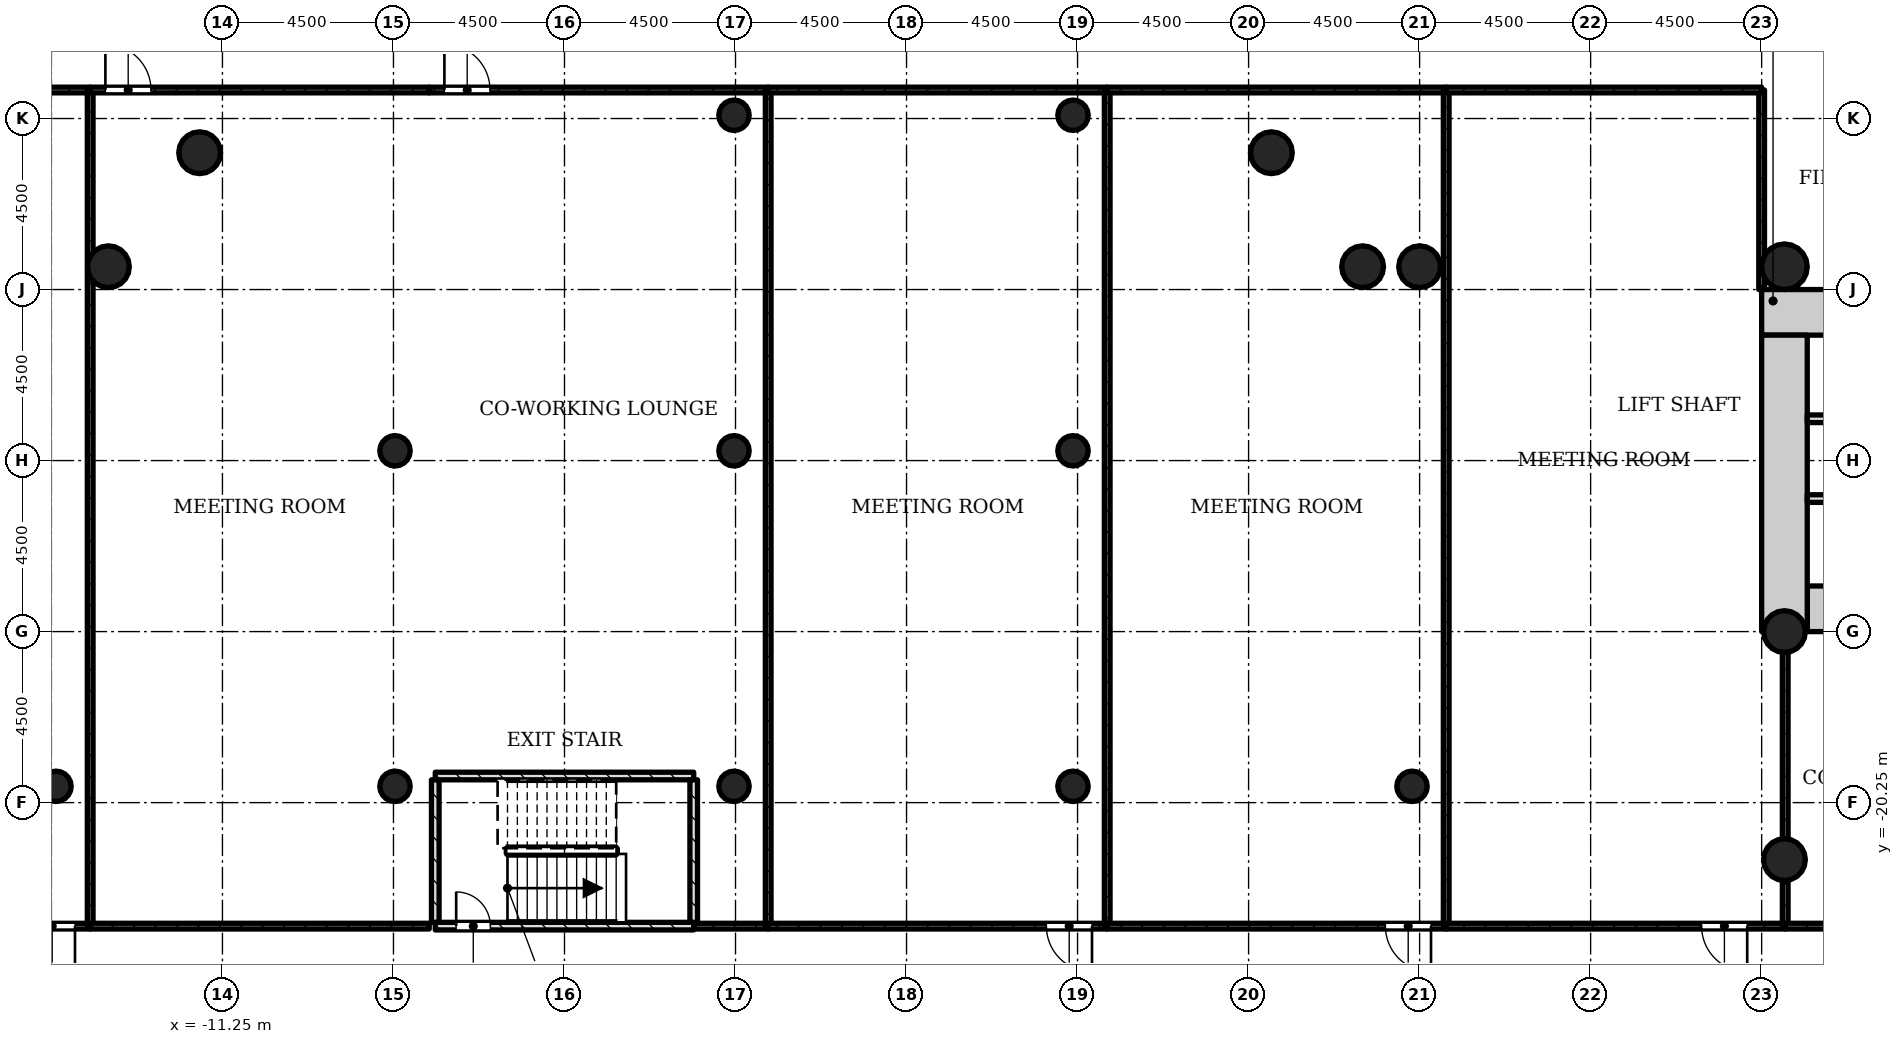
"""IFC4 building model, lengths in metres.
Left out: names, types, materials, properties, quantities, classifications, styles, units other than length and angle.
Written with IfcOpenShell. Run it as: python <this file> out.ifc"""

import sys

from ifc_helpers import new_model, si_unit, direction, frame, frame_2d, origin, origin_2d, place, context, subcontext, project, spatial, rectangle, hollow_circle, extrude, element, fill, save


model = new_model("IFC4")
c1 = context("Model", 3, precision=1e-05, world=origin(), true_north=direction((0.0, 1.0)))
c2 = subcontext(c1, "Body", "Model", "MODEL_VIEW")
j1 = project(units=[si_unit("LENGTHUNIT", "METRE"), si_unit("PLANEANGLEUNIT", "RADIAN")], contexts=[c1])
p1 = place(None, origin())
s1 = spatial("IfcSite", under=j1, at=p1, CompositionType="ELEMENT")
p2 = place(p1, origin())
s2 = spatial("IfcBuilding", under=s1, at=p2, CompositionType="ELEMENT")
p3 = place(p2, frame((0.0, 0.0, 20.0)))
s3 = spatial("IfcBuildingStorey", under=s2, at=p3, CompositionType="ELEMENT", Elevation=20.0)
p4 = place(p3, frame((30.45, -15.15, 0.0), z_axis=(0.0, 0.0, 1.0), x_axis=(1.0, 0.0, 0.0)))
e1 = element("IfcWall", 1, at=p4, inside=s3, PredefinedType="SHEAR", context=c2, shape_type="SweptSolid", body=[
    extrude(rectangle(XDim=12.3, YDim=1.2, at=frame_2d((6.15, 0.0))), origin(), (0.0, 0.0, 1.0), 4.5),
])
p5 = place(p4, frame((4.65, 0.0, 0.0)))
e2 = element("IfcOpeningElement", 2, at=p5, cuts=e1, PredefinedType="OPENING", context=c2, shape_type="SweptSolid", body=[
    extrude(rectangle(XDim=1.8, YDim=2.1, at=frame_2d((0.9, 1.05))), frame((0.0, 0.61, 0.0), z_axis=(0.0, -1.0, 0.0), x_axis=(1.0, 0.0, 0.0)), (0.0, 0.0, 1.0), 1.22),
])
p6 = place(p3, frame((41.55, -7.35, 0.0), z_axis=(0.0, 0.0, 1.0), x_axis=(-1.0, 0.0, 0.0)))
e3 = element("IfcWall", 3, at=p6, inside=s3, PredefinedType="SHEAR", context=c2, shape_type="SweptSolid", body=[
    extrude(rectangle(XDim=12.3, YDim=1.2, at=frame_2d((6.15, 0.0))), origin(), (0.0, 0.0, 1.0), 4.5),
])
p7 = place(p6, frame((4.65, 0.0, 0.0)))
e4 = element("IfcOpeningElement", 4, at=p7, cuts=e3, PredefinedType="OPENING", context=c2, shape_type="SweptSolid", body=[
    extrude(rectangle(XDim=1.8, YDim=2.1, at=frame_2d((0.9, 1.05))), frame((0.0, 0.61, 0.0), z_axis=(0.0, -1.0, 0.0), x_axis=(1.0, 0.0, 0.0)), (0.0, 0.0, 1.0), 1.22),
])
p8 = place(p3, frame((29.85, -7.95, 0.0), z_axis=(0.0, 0.0, 1.0), x_axis=(0.0, -1.0, 0.0)))
e5 = element("IfcWall", 5, at=p8, inside=s3, PredefinedType="SHEAR", context=c2, shape_type="SweptSolid", body=[
    extrude(rectangle(XDim=7.8, YDim=1.2, at=frame_2d((3.9, 0.0))), origin(), (0.0, 0.0, 1.0), 4.5),
])
for number, where, z_axis, x_axis in (
    (6, (-14.25, -6.15, 0.0), (0.0, 0.0, 1.0), (1.0, 0.0, 0.0)),
    (7, (-11.85, -3.15, 0.0), (0.0, 0.0, 1.0), (1.0, 0.0, 0.0)),
    (8, (20.25, -6.15, 0.0), (0.0, 0.0, 1.0), (1.0, 0.0, 0.0)),
    (9, (18.75, -6.15, 0.0), (0.0, 0.0, 1.0), (1.0, 0.0, 0.0)),
    (10, (16.35, -3.15, 0.0), (0.0, 0.0, 1.0), (1.0, 0.0, 0.0)),
    (11, (29.85, -15.75, 0.0), (0.0, 0.0, 1.0), (1.0, 0.0, 0.0)),
    (12, (29.85, -21.75, 0.0), (0.0, 0.0, 1.0), (1.0, 0.0, 0.0)),
):
    element("IfcColumn", number, at=place(p3, frame(where, z_axis=z_axis, x_axis=x_axis)), inside=s3, PredefinedType="COLUMN", context=c2, shape_type="SweptSolid", body=[
        extrude(hollow_circle(Radius=0.55, WallThickness=0.04, at=origin_2d()), origin(), (0.0, 0.0, 1.0), 4.5),
    ])
p9 = place(p3, frame((29.85, -6.15, 0.0), z_axis=(0.0, 0.0, 1.0), x_axis=(1.0, 0.0, 0.0)))
e13 = element("IfcColumn", 13, at=p9, inside=s3, PredefinedType="COLUMN", context=c2, shape_type="SweptSolid", body=[
    extrude(hollow_circle(Radius=0.6, WallThickness=0.045, at=origin_2d()), origin(), (0.0, 0.0, 1.0), 4.5),
])
for number, where, z_axis, x_axis in (
    (14, (-15.63, -19.821, 0.0), (0.0, 0.0, 1.0), (1.0, 0.0, 0.0)),
    (15, (-6.71, -19.821, 0.0), (0.0, 0.0, 1.0), (1.0, 0.0, 0.0)),
    (16, (2.21, -19.821, 0.0), (0.0, 0.0, 1.0), (1.0, 0.0, 0.0)),
    (17, (11.13, -19.821, 0.0), (0.0, 0.0, 1.0), (1.0, 0.0, 0.0)),
    (18, (20.05, -19.821, 0.0), (0.0, 0.0, 1.0), (1.0, 0.0, 0.0)),
    (19, (-6.71, -10.993, 0.0), (0.0, 0.0, 1.0), (1.0, 0.0, 0.0)),
    (20, (2.21, -10.993, 0.0), (0.0, 0.0, 1.0), (1.0, 0.0, 0.0)),
    (21, (11.13, -10.993, 0.0), (0.0, 0.0, 1.0), (1.0, 0.0, 0.0)),
    (22, (2.21, -2.164, 0.0), (0.0, 0.0, 1.0), (1.0, 0.0, 0.0)),
    (23, (11.13, -2.164, 0.0), (0.0, 0.0, 1.0), (1.0, 0.0, 0.0)),
):
    element("IfcColumn", number, at=place(p3, frame(where, z_axis=z_axis, x_axis=x_axis)), inside=s3, PredefinedType="COLUMN", context=c2, shape_type="SweptSolid", body=[
        extrude(hollow_circle(Radius=0.4, WallThickness=0.028, at=origin_2d()), origin(), (0.0, 0.0, 1.0), 4.08),
    ])
p10 = place(p3, frame((-20.25, -1.5, 0.0), z_axis=(0.0, 0.0, 1.0), x_axis=(1.0, 0.0, 0.0)))
e24 = element("IfcWall", 24, at=p10, inside=s3, PredefinedType="PARTITIONING", context=c2, shape_type="SweptSolid", body=[
    extrude(rectangle(XDim=5.52, YDim=0.15, at=frame_2d((2.76, 0.0))), origin(), (0.0, 0.0, 1.0), 4.075),
])
p11 = place(p3, frame((-14.73, -23.5, 0.0), z_axis=(0.0, 0.0, 1.0), x_axis=(-1.0, 0.0, 0.0)))
e25 = element("IfcWall", 25, at=p11, inside=s3, PredefinedType="PARTITIONING", context=c2, shape_type="SweptSolid", body=[
    extrude(rectangle(XDim=8.92, YDim=0.15, at=frame_2d((4.46, 0.0))), origin(), (0.0, 0.0, 1.0), 4.075),
])
p12 = place(p11, frame((0.4, 0.0, 0.0)))
e26 = element("IfcOpeningElement", 26, at=p12, cuts=e25, PredefinedType="OPENING", context=c2, shape_type="SweptSolid", body=[
    extrude(rectangle(XDim=1.2, YDim=2.1, at=frame_2d((0.6, 1.05))), frame((0.0, 0.085, 0.0), z_axis=(0.0, -1.0, 0.0), x_axis=(1.0, 0.0, 0.0)), (0.0, 0.0, 1.0), 0.17),
])
p13 = place(p3, frame((-14.73, -1.5, 0.0), z_axis=(0.0, 0.0, 1.0), x_axis=(0.0, -1.0, 0.0)))
e27 = element("IfcWall", 27, at=p13, inside=s3, PredefinedType="PARTITIONING", context=c2, shape_type="SweptSolid", body=[
    extrude(rectangle(XDim=22.0, YDim=0.15, at=frame_2d((11.0, 0.0))), origin(), (0.0, 0.0, 1.0), 4.075),
])
p14 = place(p3, frame((-14.73, -1.5, 0.0), z_axis=(0.0, 0.0, 1.0), x_axis=(1.0, 0.0, 0.0)))
e28 = element("IfcWall", 28, at=p14, inside=s3, PredefinedType="PARTITIONING", context=c2, shape_type="SweptSolid", body=[
    extrude(rectangle(XDim=8.92, YDim=0.15, at=frame_2d((4.46, 0.0))), origin(), (0.0, 0.0, 1.0), 4.075),
])
p15 = place(p14, frame((0.4, 0.0, 0.0)))
e29 = element("IfcOpeningElement", 29, at=p15, cuts=e28, PredefinedType="OPENING", context=c2, shape_type="SweptSolid", body=[
    extrude(rectangle(XDim=1.2, YDim=2.1, at=frame_2d((0.6, 1.05))), frame((0.0, 0.085, 0.0), z_axis=(0.0, -1.0, 0.0), x_axis=(1.0, 0.0, 0.0)), (0.0, 0.0, 1.0), 0.17),
])
p16 = place(p3, frame((-5.81, -23.5, 0.0), z_axis=(0.0, 0.0, 1.0), x_axis=(-1.0, 0.0, 0.0)))
e30 = element("IfcWall", 30, at=p16, inside=s3, PredefinedType="PARTITIONING", context=c2, shape_type="SweptSolid", body=[
    extrude(rectangle(XDim=8.92, YDim=0.15, at=frame_2d((4.46, 0.0))), origin(), (0.0, 0.0, 1.0), 4.075),
])
p17 = place(p3, frame((-5.65, -23.5, 0.0), z_axis=(0.0, 0.0, 1.0), x_axis=(1.0, 0.0, 0.0)))
e31 = element("IfcWall", 31, at=p17, inside=s3, PredefinedType="SHEAR", context=c2, shape_type="SweptSolid", body=[
    extrude(rectangle(XDim=6.8, YDim=0.2, at=frame_2d((3.4, 0.0))), origin(), (0.0, 0.0, 1.0), 4.075),
])
p18 = place(p17, frame((0.55, 0.0, 0.0)))
e32 = element("IfcOpeningElement", 32, at=p18, cuts=e31, PredefinedType="OPENING", context=c2, shape_type="SweptSolid", body=[
    extrude(rectangle(XDim=0.9, YDim=2.1, at=frame_2d((0.45, 1.05))), frame((0.0, 0.11, 0.0), z_axis=(0.0, -1.0, 0.0), x_axis=(1.0, 0.0, 0.0)), (0.0, 0.0, 1.0), 0.22),
])
p19 = place(p3, frame((-5.65, -19.55, 0.0), z_axis=(0.0, 0.0, 1.0), x_axis=(1.0, 0.0, 0.0)))
e33 = element("IfcWall", 33, at=p19, inside=s3, PredefinedType="SHEAR", context=c2, shape_type="SweptSolid", body=[
    extrude(rectangle(XDim=6.8, YDim=0.2, at=frame_2d((3.4, 0.0))), origin(), (0.0, 0.0, 1.0), 4.075),
])
for number, where, z_axis, x_axis in (
    (34, (-5.65, -23.4, 0.0), (0.0, 0.0, 1.0), (0.0, 1.0, 0.0)),
    (35, (1.15, -23.4, 0.0), (0.0, 0.0, 1.0), (0.0, 1.0, 0.0)),
):
    element("IfcWall", number, at=place(p3, frame(where, z_axis=z_axis, x_axis=x_axis)), inside=s3, PredefinedType="SHEAR", context=c2, shape_type="SweptSolid", body=[
        extrude(rectangle(XDim=3.75, YDim=0.2, at=frame_2d((1.875, 0.0))), origin(), (0.0, 0.0, 1.0), 4.075),
    ])
for number, where, z_axis, x_axis in (
    (36, (30.45, -10.15, 0.0), (0.0, 0.0, 1.0), (1.0, 0.0, 0.0)),
    (37, (30.45, -12.25, 0.0), (0.0, 0.0, 1.0), (1.0, 0.0, 0.0)),
):
    element("IfcWall", number, at=place(p3, frame(where, z_axis=z_axis, x_axis=x_axis)), inside=s3, PredefinedType="SOLIDWALL", context=c2, shape_type="SweptSolid", body=[
        extrude(rectangle(XDim=3.65, YDim=0.2, at=frame_2d((1.825, 0.0))), origin(), (0.0, 0.0, 1.0), 4.075),
    ])
p20 = place(p3, frame((-5.81, -1.5, 0.0), z_axis=(0.0, 0.0, 1.0), x_axis=(1.0, 0.0, 0.0)))
e38 = element("IfcWall", 38, at=p20, inside=s3, PredefinedType="PARTITIONING", context=c2, shape_type="SweptSolid", body=[
    extrude(rectangle(XDim=8.92, YDim=0.15, at=frame_2d((4.46, 0.0))), origin(), (0.0, 0.0, 1.0), 4.075),
])
p21 = place(p20, frame((0.4, 0.0, 0.0)))
e39 = element("IfcOpeningElement", 39, at=p21, cuts=e38, PredefinedType="OPENING", context=c2, shape_type="SweptSolid", body=[
    extrude(rectangle(XDim=1.2, YDim=2.1, at=frame_2d((0.6, 1.05))), frame((0.0, 0.085, 0.0), z_axis=(0.0, -1.0, 0.0), x_axis=(1.0, 0.0, 0.0)), (0.0, 0.0, 1.0), 0.17),
])
p22 = place(p3, frame((3.11, -23.5, 0.0), z_axis=(0.0, 0.0, 1.0), x_axis=(-1.0, 0.0, 0.0)))
e40 = element("IfcWall", 40, at=p22, inside=s3, PredefinedType="PARTITIONING", context=c2, shape_type="SweptSolid", body=[
    extrude(rectangle(XDim=1.96, YDim=0.15, at=frame_2d((0.98, 0.0))), origin(), (0.0, 0.0, 1.0), 4.075),
])
p23 = place(p3, frame((3.11, -1.5, 0.0), z_axis=(0.0, 0.0, 1.0), x_axis=(0.0, -1.0, 0.0)))
e41 = element("IfcWall", 41, at=p23, inside=s3, PredefinedType="PARTITIONING", context=c2, shape_type="SweptSolid", body=[
    extrude(rectangle(XDim=22.0, YDim=0.15, at=frame_2d((11.0, 0.0))), origin(), (0.0, 0.0, 1.0), 4.075),
])
p24 = place(p3, frame((12.03, -23.5, 0.0), z_axis=(0.0, 0.0, 1.0), x_axis=(-1.0, 0.0, 0.0)))
e42 = element("IfcWall", 42, at=p24, inside=s3, PredefinedType="PARTITIONING", context=c2, shape_type="SweptSolid", body=[
    extrude(rectangle(XDim=8.92, YDim=0.15, at=frame_2d((4.46, 0.0))), origin(), (0.0, 0.0, 1.0), 4.075),
])
p25 = place(p24, frame((0.4, 0.0, 0.0)))
e43 = element("IfcOpeningElement", 43, at=p25, cuts=e42, PredefinedType="OPENING", context=c2, shape_type="SweptSolid", body=[
    extrude(rectangle(XDim=1.2, YDim=2.1, at=frame_2d((0.6, 1.05))), frame((0.0, 0.085, 0.0), z_axis=(0.0, -1.0, 0.0), x_axis=(1.0, 0.0, 0.0)), (0.0, 0.0, 1.0), 0.17),
])
p26 = place(p3, frame((3.11, -1.5, 0.0), z_axis=(0.0, 0.0, 1.0), x_axis=(1.0, 0.0, 0.0)))
e44 = element("IfcWall", 44, at=p26, inside=s3, PredefinedType="PARTITIONING", context=c2, shape_type="SweptSolid", body=[
    extrude(rectangle(XDim=8.92, YDim=0.15, at=frame_2d((4.46, 0.0))), origin(), (0.0, 0.0, 1.0), 4.075),
])
p27 = place(p3, frame((12.03, -1.5, 0.0), z_axis=(0.0, 0.0, 1.0), x_axis=(0.0, -1.0, 0.0)))
e45 = element("IfcWall", 45, at=p27, inside=s3, PredefinedType="PARTITIONING", context=c2, shape_type="SweptSolid", body=[
    extrude(rectangle(XDim=22.0, YDim=0.15, at=frame_2d((11.0, 0.0))), origin(), (0.0, 0.0, 1.0), 4.075),
])
p28 = place(p3, frame((20.95, -23.5, 0.0), z_axis=(0.0, 0.0, 1.0), x_axis=(-1.0, 0.0, 0.0)))
e46 = element("IfcWall", 46, at=p28, inside=s3, PredefinedType="PARTITIONING", context=c2, shape_type="SweptSolid", body=[
    extrude(rectangle(XDim=8.92, YDim=0.15, at=frame_2d((4.46, 0.0))), origin(), (0.0, 0.0, 1.0), 4.075),
])
p29 = place(p28, frame((0.4, 0.0, 0.0)))
e47 = element("IfcOpeningElement", 47, at=p29, cuts=e46, PredefinedType="OPENING", context=c2, shape_type="SweptSolid", body=[
    extrude(rectangle(XDim=1.2, YDim=2.1, at=frame_2d((0.6, 1.05))), frame((0.0, 0.085, 0.0), z_axis=(0.0, -1.0, 0.0), x_axis=(1.0, 0.0, 0.0)), (0.0, 0.0, 1.0), 0.17),
])
p30 = place(p3, frame((12.03, -1.5, 0.0), z_axis=(0.0, 0.0, 1.0), x_axis=(1.0, 0.0, 0.0)))
e48 = element("IfcWall", 48, at=p30, inside=s3, PredefinedType="PARTITIONING", context=c2, shape_type="SweptSolid", body=[
    extrude(rectangle(XDim=8.92, YDim=0.15, at=frame_2d((4.46, 0.0))), origin(), (0.0, 0.0, 1.0), 4.075),
])
p31 = place(p3, frame((20.95, -1.5, 0.0), z_axis=(0.0, 0.0, 1.0), x_axis=(0.0, -1.0, 0.0)))
e49 = element("IfcWall", 49, at=p31, inside=s3, PredefinedType="PARTITIONING", context=c2, shape_type="SweptSolid", body=[
    extrude(rectangle(XDim=22.0, YDim=0.15, at=frame_2d((11.0, 0.0))), origin(), (0.0, 0.0, 1.0), 4.075),
])
p32 = place(p3, frame((29.25, -1.5, 0.0), z_axis=(0.0, 0.0, 1.0), x_axis=(0.0, -1.0, 0.0)))
e50 = element("IfcWall", 50, at=p32, inside=s3, PredefinedType="PARTITIONING", context=c2, shape_type="SweptSolid", body=[
    extrude(rectangle(XDim=5.25, YDim=0.15, at=frame_2d((2.625, 0.0))), origin(), (0.0, 0.0, 1.0), 4.075),
])
p33 = place(p3, frame((29.87, -23.5, 0.0), z_axis=(0.0, 0.0, 1.0), x_axis=(-1.0, 0.0, 0.0)))
e51 = element("IfcWall", 51, at=p33, inside=s3, PredefinedType="PARTITIONING", context=c2, shape_type="SweptSolid", body=[
    extrude(rectangle(XDim=8.92, YDim=0.15, at=frame_2d((4.46, 0.0))), origin(), (0.0, 0.0, 1.0), 4.075),
])
p34 = place(p33, frame((1.0, 0.0, 0.0)))
e52 = element("IfcOpeningElement", 52, at=p34, cuts=e51, PredefinedType="OPENING", context=c2, shape_type="SweptSolid", body=[
    extrude(rectangle(XDim=1.2, YDim=2.1, at=frame_2d((0.6, 1.05))), frame((0.0, 0.085, 0.0), z_axis=(0.0, -1.0, 0.0), x_axis=(1.0, 0.0, 0.0)), (0.0, 0.0, 1.0), 0.17),
])
p35 = place(p3, frame((20.95, -1.5, 0.0), z_axis=(0.0, 0.0, 1.0), x_axis=(1.0, 0.0, 0.0)))
e53 = element("IfcWall", 53, at=p35, inside=s3, PredefinedType="PARTITIONING", context=c2, shape_type="SweptSolid", body=[
    extrude(rectangle(XDim=8.3, YDim=0.15, at=frame_2d((4.15, 0.0))), origin(), (0.0, 0.0, 1.0), 4.075),
])
p36 = place(p3, frame((29.87, -15.75, 0.0), z_axis=(0.0, 0.0, 1.0), x_axis=(0.0, -1.0, 0.0)))
e54 = element("IfcWall", 54, at=p36, inside=s3, PredefinedType="PARTITIONING", context=c2, shape_type="SweptSolid", body=[
    extrude(rectangle(XDim=6.0, YDim=0.15, at=frame_2d((3.0, 0.0))), origin(), (0.0, 0.0, 1.0), 3.65),
])
p37 = place(p3, frame((29.87, -21.75, 0.0), z_axis=(0.0, 0.0, 1.0), x_axis=(0.0, -1.0, 0.0)))
e55 = element("IfcWall", 55, at=p37, inside=s3, PredefinedType="PARTITIONING", context=c2, shape_type="SweptSolid", body=[
    extrude(rectangle(XDim=1.75, YDim=0.15, at=frame_2d((0.875, 0.0))), origin(), (0.0, 0.0, 1.0), 4.075),
])
p38 = place(p3, frame((34.5, -23.5, 0.0), z_axis=(0.0, 0.0, 1.0), x_axis=(-1.0, 0.0, 0.0)))
e56 = element("IfcWall", 56, at=p38, inside=s3, PredefinedType="PARTITIONING", context=c2, shape_type="SweptSolid", body=[
    extrude(rectangle(XDim=4.63, YDim=0.15, at=frame_2d((2.315, 0.0))), origin(), (0.0, 0.0, 1.0), 4.075),
])
p39 = place(p12, origin())
e57 = element("IfcDoor", 57, at=p39, inside=s3, OperationType="SINGLE_SWING_RIGHT", PredefinedType="DOOR", context=c2, shape_type="SweptSolid", body=[
    extrude(rectangle(XDim=1.2, YDim=2.1, at=frame_2d((0.6, 1.05))), frame((0.0, 0.025, 0.0), z_axis=(0.0, -1.0, 0.0), x_axis=(1.0, 0.0, 0.0)), (0.0, 0.0, 1.0), 0.05),
])
fill(e26, e57)
p40 = place(p15, origin())
e58 = element("IfcDoor", 58, at=p40, inside=s3, OperationType="SINGLE_SWING_RIGHT", PredefinedType="DOOR", context=c2, shape_type="SweptSolid", body=[
    extrude(rectangle(XDim=1.2, YDim=2.1, at=frame_2d((0.6, 1.05))), frame((0.0, 0.025, 0.0), z_axis=(0.0, -1.0, 0.0), x_axis=(1.0, 0.0, 0.0)), (0.0, 0.0, 1.0), 0.05),
])
fill(e29, e58)
p41 = place(p18, origin())
e59 = element("IfcDoor", 59, at=p41, inside=s3, OperationType="SINGLE_SWING_RIGHT", PredefinedType="DOOR", context=c2, shape_type="SweptSolid", body=[
    extrude(rectangle(XDim=0.9, YDim=2.1, at=frame_2d((0.45, 1.05))), frame((0.0, 0.025, 0.0), z_axis=(0.0, -1.0, 0.0), x_axis=(1.0, 0.0, 0.0)), (0.0, 0.0, 1.0), 0.05),
])
fill(e32, e59)
p42 = place(p21, origin())
e60 = element("IfcDoor", 60, at=p42, inside=s3, OperationType="SINGLE_SWING_RIGHT", PredefinedType="DOOR", context=c2, shape_type="SweptSolid", body=[
    extrude(rectangle(XDim=1.2, YDim=2.1, at=frame_2d((0.6, 1.05))), frame((0.0, 0.025, 0.0), z_axis=(0.0, -1.0, 0.0), x_axis=(1.0, 0.0, 0.0)), (0.0, 0.0, 1.0), 0.05),
])
fill(e39, e60)
p43 = place(p25, origin())
e61 = element("IfcDoor", 61, at=p43, inside=s3, OperationType="SINGLE_SWING_RIGHT", PredefinedType="DOOR", context=c2, shape_type="SweptSolid", body=[
    extrude(rectangle(XDim=1.2, YDim=2.1, at=frame_2d((0.6, 1.05))), frame((0.0, 0.025, 0.0), z_axis=(0.0, -1.0, 0.0), x_axis=(1.0, 0.0, 0.0)), (0.0, 0.0, 1.0), 0.05),
])
fill(e43, e61)
p44 = place(p29, origin())
e62 = element("IfcDoor", 62, at=p44, inside=s3, OperationType="SINGLE_SWING_RIGHT", PredefinedType="DOOR", context=c2, shape_type="SweptSolid", body=[
    extrude(rectangle(XDim=1.2, YDim=2.1, at=frame_2d((0.6, 1.05))), frame((0.0, 0.025, 0.0), z_axis=(0.0, -1.0, 0.0), x_axis=(1.0, 0.0, 0.0)), (0.0, 0.0, 1.0), 0.05),
])
fill(e47, e62)
p45 = place(p34, origin())
e63 = element("IfcDoor", 63, at=p45, inside=s3, OperationType="SINGLE_SWING_RIGHT", PredefinedType="DOOR", context=c2, shape_type="SweptSolid", body=[
    extrude(rectangle(XDim=1.2, YDim=2.1, at=frame_2d((0.6, 1.05))), frame((0.0, 0.025, 0.0), z_axis=(0.0, -1.0, 0.0), x_axis=(1.0, 0.0, 0.0)), (0.0, 0.0, 1.0), 0.05),
])
fill(e52, e63)
save(model, sys.argv[1])
